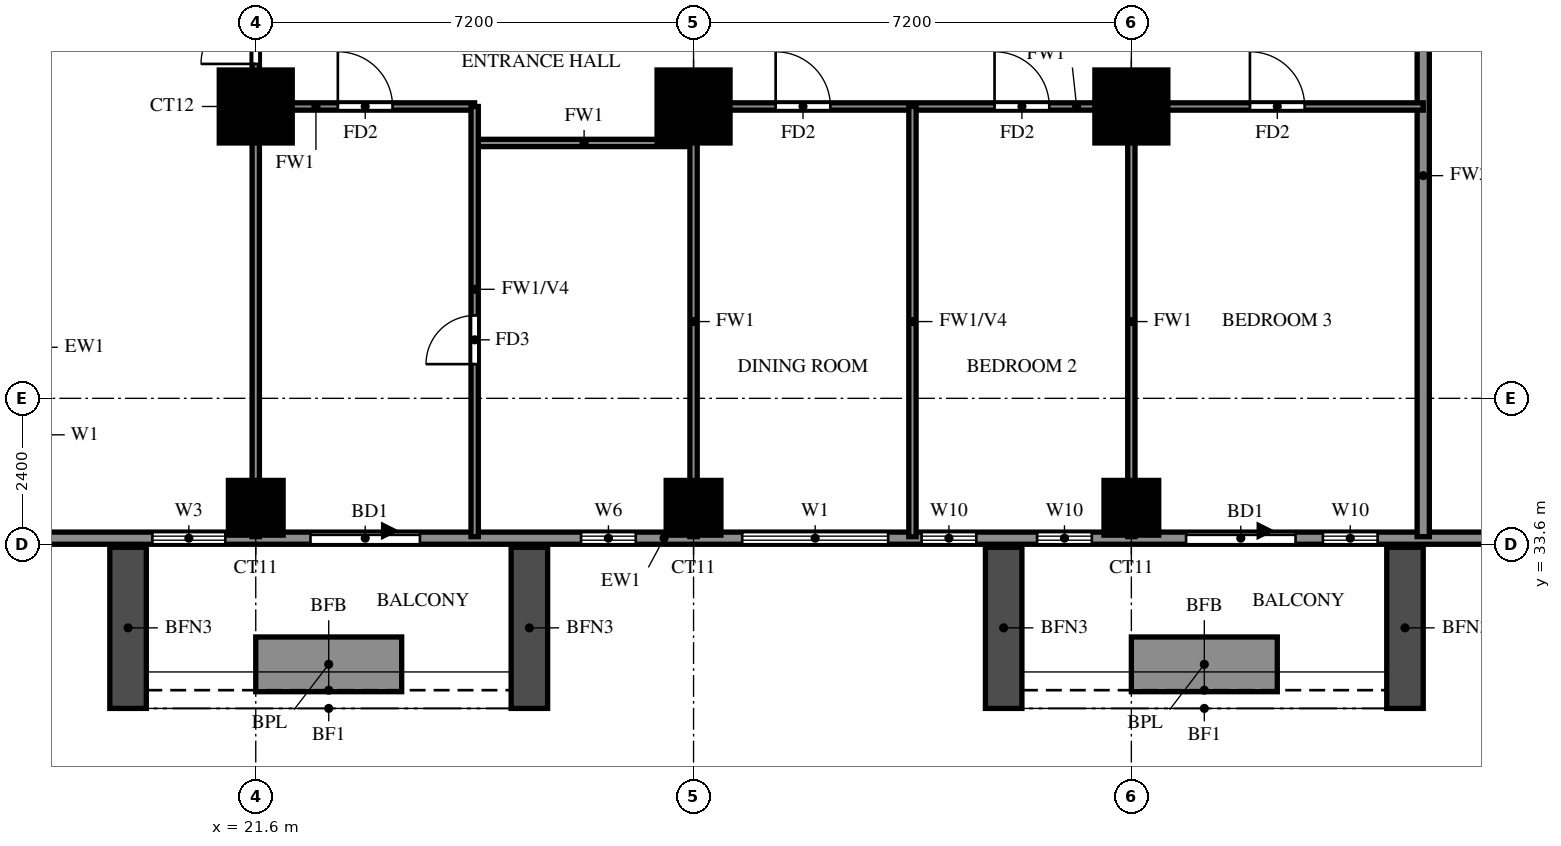
"""IFC4 building model, lengths in metres.
Left out: names, types, materials, properties, quantities, classifications, styles, units other than length and angle.
Written with IfcOpenShell. Run it as: python <this file> out.ifc"""

import sys

from ifc_helpers import new_model, si_unit, direction, frame, frame_2d, origin, origin_2d, place, context, subcontext, project, spatial, rectangle, extrude, source, transform, mapped, element, fill, save


model = new_model("IFC4")
c1 = context("Model", 3, precision=1e-05, world=origin(), true_north=direction((0.0, 1.0)))
c2 = subcontext(c1, "Body", "Model", "MODEL_VIEW")
j1 = project(units=[si_unit("LENGTHUNIT", "METRE"), si_unit("PLANEANGLEUNIT", "RADIAN")], contexts=[c1])
p1 = place(None, origin())
s1 = spatial("IfcSite", under=j1, at=p1, CompositionType="ELEMENT")
p2 = place(p1, origin())
s2 = spatial("IfcBuilding", under=s1, at=p2, CompositionType="ELEMENT")
p3 = place(p2, frame((0.0, 0.0, 97.0)))
s3 = spatial("IfcBuildingStorey", under=s2, at=p3, CompositionType="ELEMENT", Elevation=97.0)
m1 = source(origin(), c2, "Body", "SweptSolid", [
    extrude(rectangle(XDim=0.9, YDim=0.9, at=origin_2d()), origin(), (0.0, 0.0, 1.0), 3.18),
])
for number, where, z_axis, x_axis in (
    (1, (21.6, 34.2, 0.0), (0.0, 0.0, 1.0), (1.0, 0.0, 0.0)),
    (2, (28.8, 34.2, 0.0), (0.0, 0.0, 1.0), (1.0, 0.0, 0.0)),
    (3, (36.0, 34.2, 0.0), (0.0, 0.0, 1.0), (1.0, 0.0, 0.0)),
):
    element("IfcColumn", number, at=place(p3, frame(where, z_axis=z_axis, x_axis=x_axis)), inside=s3, PredefinedType="COLUMN", context=c2, shape_type="MappedRepresentation", body=[
        mapped(m1, transform((0.0, 0.0, 0.0))),
    ])
m2 = source(origin(), c2, "Body", "SweptSolid", [
    extrude(rectangle(XDim=1.2, YDim=1.2, at=origin_2d()), origin(), (0.0, 0.0, 1.0), 3.18),
])
for number, where, z_axis, x_axis in (
    (4, (21.6, 40.8, 0.0), (0.0, 0.0, 1.0), (1.0, 0.0, 0.0)),
    (5, (28.8, 40.8, 0.0), (0.0, 0.0, 1.0), (1.0, 0.0, 0.0)),
    (6, (36.0, 40.8, 0.0), (0.0, 0.0, 1.0), (1.0, 0.0, 0.0)),
):
    element("IfcColumn", number, at=place(p3, frame(where, z_axis=z_axis, x_axis=x_axis)), inside=s3, PredefinedType="COLUMN", context=c2, shape_type="MappedRepresentation", body=[
        mapped(m2, transform((0.0, 0.0, 0.0))),
    ])
p4 = place(p3, frame((18.2, 33.7, 0.0), z_axis=(0.0, 0.0, 1.0), x_axis=(1.0, 0.0, 0.0)))
e7 = element("IfcWall", 7, at=p4, inside=s3, PredefinedType="SOLIDWALL", context=c2, shape_type="SweptSolid", body=[
    extrude(rectangle(XDim=23.8, YDim=0.2, at=frame_2d((11.9, 0.0))), origin(), (0.0, 0.0, 1.0), 3.18),
])
p5 = place(p4, frame((4.3, 0.0, 0.0)))
e8 = element("IfcOpeningElement", 8, at=p5, cuts=e7, PredefinedType="OPENING", context=c2, shape_type="SweptSolid", body=[
    extrude(rectangle(XDim=1.8, YDim=2.4, at=frame_2d((0.9, 1.2))), frame((0.0, 0.11, 0.0), z_axis=(0.0, -1.0, 0.0), x_axis=(1.0, 0.0, 0.0)), (0.0, 0.0, 1.0), 0.22),
])
p6 = place(p4, frame((18.7, 0.0, 0.0)))
e9 = element("IfcOpeningElement", 9, at=p6, cuts=e7, PredefinedType="OPENING", context=c2, shape_type="SweptSolid", body=[
    extrude(rectangle(XDim=1.8, YDim=2.4, at=frame_2d((0.9, 1.2))), frame((0.0, 0.11, 0.0), z_axis=(0.0, -1.0, 0.0), x_axis=(1.0, 0.0, 0.0)), (0.0, 0.0, 1.0), 0.22),
])
p7 = place(p4, frame((1.7, 0.0, 0.6)))
e10 = element("IfcOpeningElement", 10, at=p7, cuts=e7, PredefinedType="OPENING", context=c2, shape_type="SweptSolid", body=[
    extrude(rectangle(XDim=1.2, YDim=2.4, at=frame_2d((0.6, 1.2))), frame((0.0, 0.11, 0.0), z_axis=(0.0, -1.0, 0.0), x_axis=(1.0, 0.0, 0.0)), (0.0, 0.0, 1.0), 0.22),
])
p8 = place(p4, frame((8.75, 0.0, 1.5)))
e11 = element("IfcOpeningElement", 11, at=p8, cuts=e7, PredefinedType="OPENING", context=c2, shape_type="SweptSolid", body=[
    extrude(rectangle(XDim=0.9, YDim=0.9, at=frame_2d((0.45, 0.45))), frame((0.0, 0.11, 0.0), z_axis=(0.0, -1.0, 0.0), x_axis=(1.0, 0.0, 0.0)), (0.0, 0.0, 1.0), 0.22),
])
p9 = place(p4, frame((11.4, 0.0, 0.6)))
e12 = element("IfcOpeningElement", 12, at=p9, cuts=e7, PredefinedType="OPENING", context=c2, shape_type="SweptSolid", body=[
    extrude(rectangle(XDim=2.4, YDim=2.4, at=frame_2d((1.2, 1.2))), frame((0.0, 0.11, 0.0), z_axis=(0.0, -1.0, 0.0), x_axis=(1.0, 0.0, 0.0)), (0.0, 0.0, 1.0), 0.22),
])
p10 = place(p4, frame((14.35, 0.0, 0.6)))
e13 = element("IfcOpeningElement", 13, at=p10, cuts=e7, PredefinedType="OPENING", context=c2, shape_type="SweptSolid", body=[
    extrude(rectangle(XDim=0.9, YDim=2.4, at=frame_2d((0.45, 1.2))), frame((0.0, 0.11, 0.0), z_axis=(0.0, -1.0, 0.0), x_axis=(1.0, 0.0, 0.0)), (0.0, 0.0, 1.0), 0.22),
])
p11 = place(p4, frame((16.25, 0.0, 0.6)))
e14 = element("IfcOpeningElement", 14, at=p11, cuts=e7, PredefinedType="OPENING", context=c2, shape_type="SweptSolid", body=[
    extrude(rectangle(XDim=0.9, YDim=2.4, at=frame_2d((0.45, 1.2))), frame((0.0, 0.11, 0.0), z_axis=(0.0, -1.0, 0.0), x_axis=(1.0, 0.0, 0.0)), (0.0, 0.0, 1.0), 0.22),
])
p12 = place(p4, frame((20.95, 0.0, 0.6)))
e15 = element("IfcOpeningElement", 15, at=p12, cuts=e7, PredefinedType="OPENING", context=c2, shape_type="SweptSolid", body=[
    extrude(rectangle(XDim=0.9, YDim=2.4, at=frame_2d((0.45, 1.2))), frame((0.0, 0.11, 0.0), z_axis=(0.0, -1.0, 0.0), x_axis=(1.0, 0.0, 0.0)), (0.0, 0.0, 1.0), 0.22),
])
for number, where, z_axis, x_axis in (
    (16, (19.5, 33.55, 0.0), (0.0, 0.0, 1.0), (0.0, -1.0, 0.0)),
    (17, (26.1, 33.55, 0.0), (0.0, 0.0, 1.0), (0.0, -1.0, 0.0)),
):
    element("IfcWall", number, at=place(p3, frame(where, z_axis=z_axis, x_axis=x_axis)), inside=s3, PredefinedType="SOLIDWALL", context=c2, shape_type="SweptSolid", body=[
        extrude(rectangle(XDim=2.65, YDim=0.6, at=frame_2d((1.325, 0.0))), origin(), (0.0, 0.0, 1.0), 2.85),
    ])
p13 = place(p3, frame((21.6, 31.625, 0.0), z_axis=(0.0, 0.0, 1.0), x_axis=(1.0, 0.0, 0.0)))
e18 = element("IfcWall", 18, at=p13, inside=s3, PredefinedType="SOLIDWALL", context=c2, shape_type="SweptSolid", body=[
    extrude(rectangle(XDim=2.4, YDim=0.9, at=frame_2d((1.2, 0.0))), origin(), (0.0, 0.0, 1.0), 0.9),
])
for number, where, z_axis, x_axis in (
    (19, (33.9, 33.55, 0.0), (0.0, 0.0, 1.0), (0.0, -1.0, 0.0)),
    (20, (40.5, 33.55, 0.0), (0.0, 0.0, 1.0), (0.0, -1.0, 0.0)),
):
    element("IfcWall", number, at=place(p3, frame(where, z_axis=z_axis, x_axis=x_axis)), inside=s3, PredefinedType="SOLIDWALL", context=c2, shape_type="SweptSolid", body=[
        extrude(rectangle(XDim=2.65, YDim=0.6, at=frame_2d((1.325, 0.0))), origin(), (0.0, 0.0, 1.0), 2.85),
    ])
p14 = place(p3, frame((36.0, 31.625, 0.0), z_axis=(0.0, 0.0, 1.0), x_axis=(1.0, 0.0, 0.0)))
e21 = element("IfcWall", 21, at=p14, inside=s3, PredefinedType="SOLIDWALL", context=c2, shape_type="SweptSolid", body=[
    extrude(rectangle(XDim=2.4, YDim=0.9, at=frame_2d((1.2, 0.0))), origin(), (0.0, 0.0, 1.0), 0.9),
])
p15 = place(p3, frame((40.8, 33.725, 0.0), z_axis=(0.0, 0.0, 1.0), x_axis=(0.0, 1.0, 0.0)))
e22 = element("IfcWall", 22, at=p15, inside=s3, PredefinedType="SOLIDWALL", context=c2, shape_type="SweptSolid", body=[
    extrude(rectangle(XDim=11.875, YDim=0.2, at=frame_2d((5.938, 0.0))), origin(), (0.0, 0.0, 1.0), 2.28),
])
p16 = place(p3, frame((25.2, 40.2, 0.0), z_axis=(0.0, 0.0, 1.0), x_axis=(1.0, 0.0, 0.0)))
e23 = element("IfcWall", 23, at=p16, inside=s3, PredefinedType="PARTITIONING", context=c2, shape_type="SweptSolid", body=[
    extrude(rectangle(XDim=3.6, YDim=0.12, at=frame_2d((1.8, 0.0))), origin(), (0.0, 0.0, 1.0), 3.18),
])
p17 = place(p3, frame((21.6, 40.8, 0.0), z_axis=(0.0, 0.0, 1.0), x_axis=(1.0, 0.0, 0.0)))
e24 = element("IfcWall", 24, at=p17, inside=s3, PredefinedType="PARTITIONING", context=c2, shape_type="SweptSolid", body=[
    extrude(rectangle(XDim=3.6, YDim=0.12, at=frame_2d((1.8, 0.0))), origin(), (0.0, 0.0, 1.0), 3.18),
])
p18 = place(p17, frame((1.35, 0.0, 0.0)))
e25 = element("IfcOpeningElement", 25, at=p18, cuts=e24, PredefinedType="OPENING", context=c2, shape_type="SweptSolid", body=[
    extrude(rectangle(XDim=0.9, YDim=2.1, at=frame_2d((0.45, 1.05))), frame((0.0, 0.07, 0.0), z_axis=(0.0, -1.0, 0.0), x_axis=(1.0, 0.0, 0.0)), (0.0, 0.0, 1.0), 0.14),
])
p19 = place(p3, frame((28.8, 40.8, 0.0), z_axis=(0.0, 0.0, 1.0), x_axis=(1.0, 0.0, 0.0)))
e26 = element("IfcWall", 26, at=p19, inside=s3, PredefinedType="PARTITIONING", context=c2, shape_type="SweptSolid", body=[
    extrude(rectangle(XDim=12.0, YDim=0.12, at=frame_2d((6.0, 0.0))), origin(), (0.0, 0.0, 1.0), 3.18),
])
p20 = place(p19, frame((1.35, 0.0, 0.0)))
e27 = element("IfcOpeningElement", 27, at=p20, cuts=e26, PredefinedType="OPENING", context=c2, shape_type="SweptSolid", body=[
    extrude(rectangle(XDim=0.9, YDim=2.1, at=frame_2d((0.45, 1.05))), frame((0.0, 0.07, 0.0), z_axis=(0.0, -1.0, 0.0), x_axis=(1.0, 0.0, 0.0)), (0.0, 0.0, 1.0), 0.14),
])
p21 = place(p19, frame((4.95, 0.0, 0.0)))
e28 = element("IfcOpeningElement", 28, at=p21, cuts=e26, PredefinedType="OPENING", context=c2, shape_type="SweptSolid", body=[
    extrude(rectangle(XDim=0.9, YDim=2.1, at=frame_2d((0.45, 1.05))), frame((0.0, 0.07, 0.0), z_axis=(0.0, -1.0, 0.0), x_axis=(1.0, 0.0, 0.0)), (0.0, 0.0, 1.0), 0.14),
])
p22 = place(p19, frame((9.15, 0.0, 0.0)))
e29 = element("IfcOpeningElement", 29, at=p22, cuts=e26, PredefinedType="OPENING", context=c2, shape_type="SweptSolid", body=[
    extrude(rectangle(XDim=0.9, YDim=2.1, at=frame_2d((0.45, 1.05))), frame((0.0, 0.07, 0.0), z_axis=(0.0, -1.0, 0.0), x_axis=(1.0, 0.0, 0.0)), (0.0, 0.0, 1.0), 0.14),
])
p23 = place(p3, frame((21.6, 33.725, 0.0), z_axis=(0.0, 0.0, 1.0), x_axis=(0.0, 1.0, 0.0)))
e30 = element("IfcWall", 30, at=p23, inside=s3, PredefinedType="PARTITIONING", context=c2, shape_type="SweptSolid", body=[
    extrude(rectangle(XDim=28.675, YDim=0.12, at=frame_2d((14.337, 0.0))), origin(), (0.0, 0.0, 1.0), 3.18),
])
p24 = place(p23, frame((7.775, 0.0, 0.0)))
e31 = element("IfcOpeningElement", 31, at=p24, cuts=e30, PredefinedType="OPENING", context=c2, shape_type="SweptSolid", body=[
    extrude(rectangle(XDim=0.9, YDim=2.1, at=frame_2d((0.45, 1.05))), frame((0.0, 0.07, 0.0), z_axis=(0.0, -1.0, 0.0), x_axis=(1.0, 0.0, 0.0)), (0.0, 0.0, 1.0), 0.14),
])
p25 = place(p23, frame((17.125, 0.0, 0.0)))
e32 = element("IfcOpeningElement", 32, at=p25, cuts=e30, PredefinedType="OPENING", context=c2, shape_type="SweptSolid", body=[
    extrude(rectangle(XDim=1.5, YDim=2.1, at=frame_2d((0.75, 1.05))), frame((0.0, 0.07, 0.0), z_axis=(0.0, -1.0, 0.0), x_axis=(1.0, 0.0, 0.0)), (0.0, 0.0, 1.0), 0.14),
])
p26 = place(p23, frame((22.825, 0.0, 0.0)))
e33 = element("IfcOpeningElement", 33, at=p26, cuts=e30, PredefinedType="OPENING", context=c2, shape_type="SweptSolid", body=[
    extrude(rectangle(XDim=0.9, YDim=2.1, at=frame_2d((0.45, 1.05))), frame((0.0, 0.07, 0.0), z_axis=(0.0, -1.0, 0.0), x_axis=(1.0, 0.0, 0.0)), (0.0, 0.0, 1.0), 0.14),
])
p27 = place(p23, frame((26.425, 0.0, 0.0)))
e34 = element("IfcOpeningElement", 34, at=p27, cuts=e30, PredefinedType="OPENING", context=c2, shape_type="SweptSolid", body=[
    extrude(rectangle(XDim=0.9, YDim=2.1, at=frame_2d((0.45, 1.05))), frame((0.0, 0.07, 0.0), z_axis=(0.0, -1.0, 0.0), x_axis=(1.0, 0.0, 0.0)), (0.0, 0.0, 1.0), 0.14),
])
p28 = place(p3, frame((25.2, 33.725, 0.0), z_axis=(0.0, 0.0, 1.0), x_axis=(0.0, 1.0, 0.0)))
e35 = element("IfcWall", 35, at=p28, inside=s3, PredefinedType="PARTITIONING", context=c2, shape_type="SweptSolid", body=[
    extrude(rectangle(XDim=7.075, YDim=0.12, at=frame_2d((3.538, 0.0))), origin(), (0.0, 0.0, 1.0), 2.28),
])
p29 = place(p28, frame((2.837, 0.0, 0.0)))
e36 = element("IfcOpeningElement", 36, at=p29, cuts=e35, PredefinedType="OPENING", context=c2, shape_type="SweptSolid", body=[
    extrude(rectangle(XDim=0.8, YDim=2.1, at=frame_2d((0.4, 1.05))), frame((0.0, 0.07, 0.0), z_axis=(0.0, -1.0, 0.0), x_axis=(1.0, 0.0, 0.0)), (0.0, 0.0, 1.0), 0.14),
])
p30 = place(p3, frame((28.8, 33.725, 0.0), z_axis=(0.0, 0.0, 1.0), x_axis=(0.0, 1.0, 0.0)))
e37 = element("IfcWall", 37, at=p30, inside=s3, PredefinedType="PARTITIONING", context=c2, shape_type="SweptSolid", body=[
    extrude(rectangle(XDim=7.075, YDim=0.12, at=frame_2d((3.538, 0.0))), origin(), (0.0, 0.0, 1.0), 3.18),
])
p31 = place(p3, frame((32.4, 33.725, 0.0), z_axis=(0.0, 0.0, 1.0), x_axis=(0.0, 1.0, 0.0)))
e38 = element("IfcWall", 38, at=p31, inside=s3, PredefinedType="PARTITIONING", context=c2, shape_type="SweptSolid", body=[
    extrude(rectangle(XDim=7.075, YDim=0.12, at=frame_2d((3.538, 0.0))), origin(), (0.0, 0.0, 1.0), 2.28),
])
p32 = place(p3, frame((36.0, 33.725, 0.0), z_axis=(0.0, 0.0, 1.0), x_axis=(0.0, 1.0, 0.0)))
e39 = element("IfcWall", 39, at=p32, inside=s3, PredefinedType="PARTITIONING", context=c2, shape_type="SweptSolid", body=[
    extrude(rectangle(XDim=7.075, YDim=0.12, at=frame_2d((3.538, 0.0))), origin(), (0.0, 0.0, 1.0), 3.18),
])
p33 = place(p5, origin())
e40 = element("IfcDoor", 40, at=p33, inside=s3, OperationType="DOUBLE_DOOR_SLIDING", PredefinedType="DOOR", context=c2, shape_type="SweptSolid", body=[
    extrude(rectangle(XDim=1.8, YDim=2.4, at=frame_2d((0.9, 1.2))), frame((0.0, 0.025, 0.0), z_axis=(0.0, -1.0, 0.0), x_axis=(1.0, 0.0, 0.0)), (0.0, 0.0, 1.0), 0.05),
])
fill(e8, e40)
p34 = place(p6, origin())
e41 = element("IfcDoor", 41, at=p34, inside=s3, OperationType="DOUBLE_DOOR_SLIDING", PredefinedType="DOOR", context=c2, shape_type="SweptSolid", body=[
    extrude(rectangle(XDim=1.8, YDim=2.4, at=frame_2d((0.9, 1.2))), frame((0.0, 0.025, 0.0), z_axis=(0.0, -1.0, 0.0), x_axis=(1.0, 0.0, 0.0)), (0.0, 0.0, 1.0), 0.05),
])
fill(e9, e41)
p35 = place(p7, origin())
e42 = element("IfcWindow", 42, at=p35, inside=s3, PartitioningType="SINGLE_PANEL", PredefinedType="WINDOW", context=c2, shape_type="SweptSolid", body=[
    extrude(rectangle(XDim=1.2, YDim=2.4, at=frame_2d((0.6, 1.2))), frame((0.0, 0.03, 0.0), z_axis=(0.0, -1.0, 0.0), x_axis=(1.0, 0.0, 0.0)), (0.0, 0.0, 1.0), 0.06),
])
fill(e10, e42)
p36 = place(p8, origin())
e43 = element("IfcWindow", 43, at=p36, inside=s3, PartitioningType="SINGLE_PANEL", PredefinedType="WINDOW", context=c2, shape_type="SweptSolid", body=[
    extrude(rectangle(XDim=0.9, YDim=0.9, at=frame_2d((0.45, 0.45))), frame((0.0, 0.03, 0.0), z_axis=(0.0, -1.0, 0.0), x_axis=(1.0, 0.0, 0.0)), (0.0, 0.0, 1.0), 0.06),
])
fill(e11, e43)
p37 = place(p9, origin())
e44 = element("IfcWindow", 44, at=p37, inside=s3, PartitioningType="DOUBLE_PANEL_VERTICAL", PredefinedType="WINDOW", context=c2, shape_type="SweptSolid", body=[
    extrude(rectangle(XDim=2.4, YDim=2.4, at=frame_2d((1.2, 1.2))), frame((0.0, 0.03, 0.0), z_axis=(0.0, -1.0, 0.0), x_axis=(1.0, 0.0, 0.0)), (0.0, 0.0, 1.0), 0.06),
])
fill(e12, e44)
p38 = place(p10, origin())
e45 = element("IfcWindow", 45, at=p38, inside=s3, PartitioningType="SINGLE_PANEL", PredefinedType="WINDOW", context=c2, shape_type="SweptSolid", body=[
    extrude(rectangle(XDim=0.9, YDim=2.4, at=frame_2d((0.45, 1.2))), frame((0.0, 0.03, 0.0), z_axis=(0.0, -1.0, 0.0), x_axis=(1.0, 0.0, 0.0)), (0.0, 0.0, 1.0), 0.06),
])
fill(e13, e45)
p39 = place(p11, origin())
e46 = element("IfcWindow", 46, at=p39, inside=s3, PartitioningType="SINGLE_PANEL", PredefinedType="WINDOW", context=c2, shape_type="SweptSolid", body=[
    extrude(rectangle(XDim=0.9, YDim=2.4, at=frame_2d((0.45, 1.2))), frame((0.0, 0.03, 0.0), z_axis=(0.0, -1.0, 0.0), x_axis=(1.0, 0.0, 0.0)), (0.0, 0.0, 1.0), 0.06),
])
fill(e14, e46)
p40 = place(p12, origin())
e47 = element("IfcWindow", 47, at=p40, inside=s3, PartitioningType="SINGLE_PANEL", PredefinedType="WINDOW", context=c2, shape_type="SweptSolid", body=[
    extrude(rectangle(XDim=0.9, YDim=2.4, at=frame_2d((0.45, 1.2))), frame((0.0, 0.03, 0.0), z_axis=(0.0, -1.0, 0.0), x_axis=(1.0, 0.0, 0.0)), (0.0, 0.0, 1.0), 0.06),
])
fill(e15, e47)
p41 = place(p24, origin())
e48 = element("IfcDoor", 48, at=p41, inside=s3, OperationType="SINGLE_SWING_RIGHT", PredefinedType="DOOR", context=c2, shape_type="SweptSolid", body=[
    extrude(rectangle(XDim=0.9, YDim=2.1, at=frame_2d((0.45, 1.05))), frame((0.0, 0.025, 0.0), z_axis=(0.0, -1.0, 0.0), x_axis=(1.0, 0.0, 0.0)), (0.0, 0.0, 1.0), 0.05),
])
fill(e31, e48)
p42 = place(p18, origin())
e49 = element("IfcDoor", 49, at=p42, inside=s3, OperationType="SINGLE_SWING_RIGHT", PredefinedType="DOOR", context=c2, shape_type="SweptSolid", body=[
    extrude(rectangle(XDim=0.9, YDim=2.1, at=frame_2d((0.45, 1.05))), frame((0.0, 0.025, 0.0), z_axis=(0.0, -1.0, 0.0), x_axis=(1.0, 0.0, 0.0)), (0.0, 0.0, 1.0), 0.05),
])
fill(e25, e49)
p43 = place(p29, origin())
e50 = element("IfcDoor", 50, at=p43, inside=s3, OperationType="SINGLE_SWING_LEFT", PredefinedType="DOOR", context=c2, shape_type="SweptSolid", body=[
    extrude(rectangle(XDim=0.8, YDim=2.1, at=frame_2d((0.4, 1.05))), frame((0.0, 0.025, 0.0), z_axis=(0.0, -1.0, 0.0), x_axis=(1.0, 0.0, 0.0)), (0.0, 0.0, 1.0), 0.05),
])
fill(e36, e50)
p44 = place(p20, origin())
e51 = element("IfcDoor", 51, at=p44, inside=s3, OperationType="SINGLE_SWING_LEFT", PredefinedType="DOOR", context=c2, shape_type="SweptSolid", body=[
    extrude(rectangle(XDim=0.9, YDim=2.1, at=frame_2d((0.45, 1.05))), frame((0.0, 0.025, 0.0), z_axis=(0.0, -1.0, 0.0), x_axis=(1.0, 0.0, 0.0)), (0.0, 0.0, 1.0), 0.05),
])
fill(e27, e51)
p45 = place(p21, origin())
e52 = element("IfcDoor", 52, at=p45, inside=s3, OperationType="SINGLE_SWING_RIGHT", PredefinedType="DOOR", context=c2, shape_type="SweptSolid", body=[
    extrude(rectangle(XDim=0.9, YDim=2.1, at=frame_2d((0.45, 1.05))), frame((0.0, 0.025, 0.0), z_axis=(0.0, -1.0, 0.0), x_axis=(1.0, 0.0, 0.0)), (0.0, 0.0, 1.0), 0.05),
])
fill(e28, e52)
p46 = place(p22, origin())
e53 = element("IfcDoor", 53, at=p46, inside=s3, OperationType="SINGLE_SWING_LEFT", PredefinedType="DOOR", context=c2, shape_type="SweptSolid", body=[
    extrude(rectangle(XDim=0.9, YDim=2.1, at=frame_2d((0.45, 1.05))), frame((0.0, 0.025, 0.0), z_axis=(0.0, -1.0, 0.0), x_axis=(1.0, 0.0, 0.0)), (0.0, 0.0, 1.0), 0.05),
])
fill(e29, e53)
save(model, sys.argv[1])
